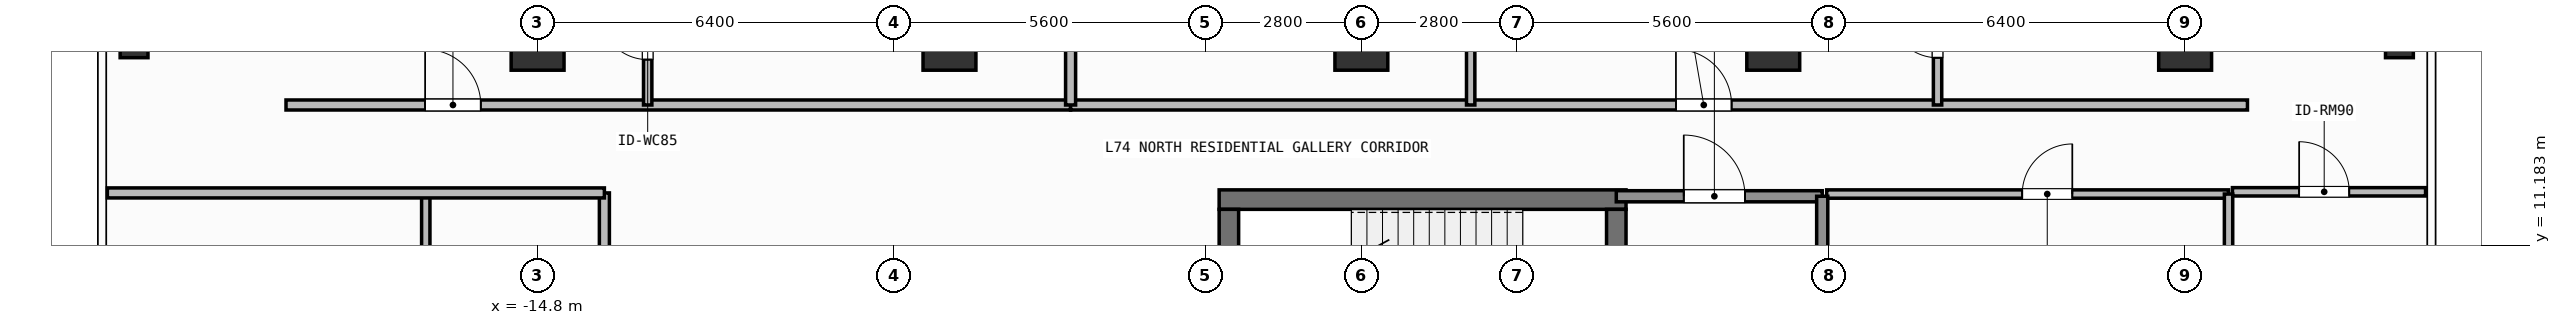
"""IFC4 building model, lengths in metres.
Left out: names, types, materials, properties, quantities, classifications, styles, units other than length and angle.
Written with IfcOpenShell. Run it as: python <this file> out.ifc"""

import sys

from ifc_helpers import new_model, si_unit, direction, frame, frame_2d, origin, origin_2d, place, context, subcontext, project, spatial, rectangle, hollow_rectangle, extrude, element, fill, save


model = new_model("IFC4")
c1 = context("Model", 3, precision=1e-05, world=origin(), true_north=direction((0.0, 1.0)))
c2 = subcontext(c1, "Body", "Model", "MODEL_VIEW")
j1 = project(units=[si_unit("LENGTHUNIT", "METRE"), si_unit("PLANEANGLEUNIT", "RADIAN")], contexts=[c1])
p1 = place(None, origin())
s1 = spatial("IfcSite", under=j1, at=p1, CompositionType="ELEMENT")
p2 = place(p1, origin())
s2 = spatial("IfcBuilding", under=s1, at=p2, CompositionType="ELEMENT")
p3 = place(p2, frame((0.0, 0.0, 301.5)))
s3 = spatial("IfcBuildingStorey", under=s2, at=p3, CompositionType="ELEMENT", Elevation=301.5)
p4 = place(p3, frame((-2.555, 12.0, 0.0), z_axis=(0.0, 0.0, 1.0), x_axis=(1.0, 0.0, 0.0)))
e1 = element("IfcWall", 1, at=p4, inside=s3, PredefinedType="SHEAR", context=c2, shape_type="SweptSolid", body=[
    extrude(rectangle(XDim=7.31, YDim=0.35, at=frame_2d((3.655, 0.0))), origin(), (0.0, 0.0, 1.0), 3.9),
])
p5 = place(p3, frame((-2.38, 8.9, 0.0), z_axis=(0.0, 0.0, 1.0), x_axis=(0.0, 1.0, 0.0)))
e2 = element("IfcWall", 2, at=p5, inside=s3, PredefinedType="SHEAR", context=c2, shape_type="SweptSolid", body=[
    extrude(rectangle(XDim=2.925, YDim=0.35, at=frame_2d((1.462, 0.0))), origin(), (0.0, 0.0, 1.0), 3.9),
])
p6 = place(p3, frame((4.58, 11.825, 0.0), z_axis=(0.0, 0.0, 1.0), x_axis=(0.0, -1.0, 0.0)))
e3 = element("IfcWall", 3, at=p6, inside=s3, PredefinedType="SHEAR", context=c2, shape_type="SweptSolid", body=[
    extrude(rectangle(XDim=2.925, YDim=0.35, at=frame_2d((1.462, 0.0))), origin(), (0.0, 0.0, 1.0), 3.9),
])
p7 = place(p6, frame((0.913, 0.0, 0.0)))
e4 = element("IfcOpeningElement", 4, at=p7, cuts=e3, PredefinedType="OPENING", context=c2, shape_type="SweptSolid", body=[
    extrude(rectangle(XDim=1.1, YDim=2.15, at=frame_2d((0.55, 1.075))), frame((0.0, 0.185, 0.0), z_axis=(0.0, -1.0, 0.0), x_axis=(1.0, 0.0, 0.0)), (0.0, 0.0, 1.0), 0.37),
])
for number, where, z_axis, x_axis in (
    (5, (-14.8, 14.8, 0.0), (0.0, 0.0, 1.0), (1.0, 0.0, 0.0)),
    (6, (-7.4, 14.8, 0.0), (0.0, 0.0, 1.0), (1.0, 0.0, 0.0)),
    (7, (0.0, 14.8, 0.0), (0.0, 0.0, 1.0), (1.0, 0.0, 0.0)),
    (8, (7.4, 14.8, 0.0), (0.0, 0.0, 1.0), (1.0, 0.0, 0.0)),
    (9, (14.8, 14.8, 0.0), (0.0, 0.0, 1.0), (1.0, 0.0, 0.0)),
):
    element("IfcColumn", number, at=place(p3, frame(where, z_axis=z_axis, x_axis=x_axis)), inside=s3, PredefinedType="COLUMN", context=c2, shape_type="SweptSolid", body=[
        extrude(rectangle(XDim=0.95, YDim=0.95, at=origin_2d()), origin(), (0.0, 0.0, 1.0), 3.9),
    ])
for number, where, z_axis, x_axis in (
    (10, (-22.05, 14.8, 0.0), (0.0, 0.0, 1.0), (1.0, 0.0, 0.0)),
    (11, (18.65, 14.8, 0.0), (0.0, 0.0, 1.0), (1.0, 0.0, 0.0)),
):
    element("IfcColumn", number, at=place(p3, frame(where, z_axis=z_axis, x_axis=x_axis)), inside=s3, PredefinedType="COLUMN", context=c2, shape_type="SweptSolid", body=[
        extrude(hollow_rectangle(XDim=0.5, YDim=0.5, WallThickness=0.025, at=origin_2d()), origin(), (0.0, 0.0, 1.0), 3.9),
    ])
p8 = place(p3, frame((4.58, 12.06, 0.0), z_axis=(0.0, 0.0, 1.0), x_axis=(1.0, 0.0, 0.0)))
e12 = element("IfcWall", 12, at=p8, inside=s3, PredefinedType="SOLIDWALL", context=c2, shape_type="SweptSolid", body=[
    extrude(rectangle(XDim=3.7, YDim=0.2, at=frame_2d((1.85, 0.0))), origin(), (0.0, 0.0, 1.0), 3.68),
])
p9 = place(p8, frame((1.212, 0.0, 0.0)))
e13 = element("IfcOpeningElement", 13, at=p9, cuts=e12, PredefinedType="OPENING", context=c2, shape_type="SweptSolid", body=[
    extrude(rectangle(XDim=1.1, YDim=2.15, at=frame_2d((0.55, 1.075))), frame((0.0, 0.11, 0.0), z_axis=(0.0, -1.0, 0.0), x_axis=(1.0, 0.0, 0.0)), (0.0, 0.0, 1.0), 0.22),
])
p10 = place(p3, frame((8.36, 12.1, 0.0), z_axis=(0.0, 0.0, 1.0), x_axis=(1.0, 0.0, 0.0)))
e14 = element("IfcWall", 14, at=p10, inside=s3, PredefinedType="PARTITIONING", context=c2, shape_type="SweptSolid", body=[
    extrude(rectangle(XDim=7.22, YDim=0.15, at=frame_2d((3.61, 0.0))), origin(), (0.0, 0.0, 1.0), 3.68),
])
p11 = place(p10, frame((3.513, 0.0, 0.0)))
e15 = element("IfcOpeningElement", 15, at=p11, cuts=e14, PredefinedType="OPENING", context=c2, shape_type="SweptSolid", body=[
    extrude(rectangle(XDim=0.9, YDim=2.1, at=frame_2d((0.45, 1.05))), frame((0.0, 0.085, 0.0), z_axis=(0.0, -1.0, 0.0), x_axis=(1.0, 0.0, 0.0)), (0.0, 0.0, 1.0), 0.17),
])
p12 = place(p3, frame((-19.32, 13.7, 0.0), z_axis=(0.0, 0.0, 1.0), x_axis=(1.0, 0.0, 0.0)))
e16 = element("IfcWall", 16, at=p12, inside=s3, PredefinedType="PARTITIONING", context=c2, shape_type="SweptSolid", body=[
    extrude(rectangle(XDim=14.096, YDim=0.18, at=frame_2d((7.048, 0.0))), origin(), (0.0, 0.0, 1.0), 3.68),
])
p13 = place(p12, frame((2.499, 0.0, 0.0)))
e17 = element("IfcOpeningElement", 17, at=p13, cuts=e16, PredefinedType="OPENING", context=c2, shape_type="SweptSolid", body=[
    extrude(rectangle(XDim=1.0, YDim=2.2, at=frame_2d((0.5, 1.1))), frame((0.0, 0.1, 0.0), z_axis=(0.0, -1.0, 0.0), x_axis=(1.0, 0.0, 0.0)), (0.0, 0.0, 1.0), 0.2),
])
p14 = place(p3, frame((-12.822, 13.7, 0.0), z_axis=(0.0, 0.0, 1.0), x_axis=(0.0, 1.0, 0.0)))
e18 = element("IfcWall", 18, at=p14, inside=s3, PredefinedType="PARTITIONING", context=c2, shape_type="SweptSolid", body=[
    extrude(rectangle(XDim=2.317, YDim=0.15, at=frame_2d((1.159, 0.0))), origin(), (0.0, 0.0, 1.0), 3.68),
])
p15 = place(p14, frame((0.815, 0.0, 0.0)))
e19 = element("IfcOpeningElement", 19, at=p15, cuts=e18, PredefinedType="OPENING", context=c2, shape_type="SweptSolid", body=[
    extrude(rectangle(XDim=0.85, YDim=2.1, at=frame_2d((0.425, 1.05))), frame((0.0, 0.085, 0.0), z_axis=(0.0, -1.0, 0.0), x_axis=(1.0, 0.0, 0.0)), (0.0, 0.0, 1.0), 0.17),
])
p16 = place(p3, frame((-5.224, 13.7, 0.0), z_axis=(0.0, 0.0, 1.0), x_axis=(1.0, 0.0, 0.0)))
e20 = element("IfcWall", 20, at=p16, inside=s3, PredefinedType="PARTITIONING", context=c2, shape_type="SweptSolid", body=[
    extrude(rectangle(XDim=21.144, YDim=0.18, at=frame_2d((10.572, 0.0))), origin(), (0.0, 0.0, 1.0), 3.68),
])
p17 = place(p16, frame((10.876, 0.0, 0.0)))
e21 = element("IfcOpeningElement", 21, at=p17, cuts=e20, PredefinedType="OPENING", context=c2, shape_type="SweptSolid", body=[
    extrude(rectangle(XDim=1.0, YDim=2.2, at=frame_2d((0.5, 1.1))), frame((0.0, 0.1, 0.0), z_axis=(0.0, -1.0, 0.0), x_axis=(1.0, 0.0, 0.0)), (0.0, 0.0, 1.0), 0.2),
])
p18 = place(p3, frame((1.964, 13.7, 0.0), z_axis=(0.0, 0.0, 1.0), x_axis=(0.0, 1.0, 0.0)))
e22 = element("IfcWall", 22, at=p18, inside=s3, PredefinedType="PARTITIONING", context=c2, shape_type="SweptSolid", body=[
    extrude(rectangle(XDim=4.29, YDim=0.15, at=frame_2d((2.145, 0.0))), origin(), (0.0, 0.0, 1.0), 3.68),
])
p19 = place(p18, frame((1.72, 0.0, 0.0)))
e23 = element("IfcOpeningElement", 23, at=p19, cuts=e22, PredefinedType="OPENING", context=c2, shape_type="SweptSolid", body=[
    extrude(rectangle(XDim=0.85, YDim=2.1, at=frame_2d((0.425, 1.05))), frame((0.0, 0.085, 0.0), z_axis=(0.0, -1.0, 0.0), x_axis=(1.0, 0.0, 0.0)), (0.0, 0.0, 1.0), 0.17),
])
p20 = place(p3, frame((10.352, 13.7, 0.0), z_axis=(0.0, 0.0, 1.0), x_axis=(0.0, 1.0, 0.0)))
e24 = element("IfcWall", 24, at=p20, inside=s3, PredefinedType="PARTITIONING", context=c2, shape_type="SweptSolid", body=[
    extrude(rectangle(XDim=2.72, YDim=0.15, at=frame_2d((1.36, 0.0))), origin(), (0.0, 0.0, 1.0), 3.68),
])
p21 = place(p20, frame((0.849, 0.0, 0.0)))
e25 = element("IfcOpeningElement", 25, at=p21, cuts=e24, PredefinedType="OPENING", context=c2, shape_type="SweptSolid", body=[
    extrude(rectangle(XDim=0.85, YDim=2.1, at=frame_2d((0.425, 1.05))), frame((0.0, 0.085, 0.0), z_axis=(0.0, -1.0, 0.0), x_axis=(1.0, 0.0, 0.0)), (0.0, 0.0, 1.0), 0.17),
])
p22 = place(p3, frame((-13.6, -12.12, 0.0), z_axis=(0.0, 0.0, 1.0), x_axis=(0.0, 1.0, 0.0)))
e26 = element("IfcWall", 26, at=p22, inside=s3, PredefinedType="PARTITIONING", context=c2, shape_type="SweptSolid", body=[
    extrude(rectangle(XDim=24.24, YDim=0.18, at=frame_2d((12.12, 0.0))), origin(), (0.0, 0.0, 1.0), 3.68),
])
p23 = place(p22, frame((9.829, 0.0, 0.0)))
e27 = element("IfcOpeningElement", 27, at=p23, cuts=e26, PredefinedType="OPENING", context=c2, shape_type="SweptSolid", body=[
    extrude(rectangle(XDim=1.0, YDim=2.2, at=frame_2d((0.5, 1.1))), frame((0.0, 0.1, 0.0), z_axis=(0.0, -1.0, 0.0), x_axis=(1.0, 0.0, 0.0)), (0.0, 0.0, 1.0), 0.2),
])
p24 = place(p3, frame((15.65, 12.14, 0.0), z_axis=(0.0, 0.0, 1.0), x_axis=(1.0, 0.0, 0.0)))
e28 = element("IfcWall", 28, at=p24, inside=s3, PredefinedType="PARTITIONING", context=c2, shape_type="SweptSolid", body=[
    extrude(rectangle(XDim=3.47, YDim=0.15, at=frame_2d((1.735, 0.0))), origin(), (0.0, 0.0, 1.0), 3.68),
])
p25 = place(p24, frame((1.198, 0.0, 0.0)))
e29 = element("IfcOpeningElement", 29, at=p25, cuts=e28, PredefinedType="OPENING", context=c2, shape_type="SweptSolid", body=[
    extrude(rectangle(XDim=0.9, YDim=2.1, at=frame_2d((0.45, 1.05))), frame((0.0, 0.085, 0.0), z_axis=(0.0, -1.0, 0.0), x_axis=(1.0, 0.0, 0.0)), (0.0, 0.0, 1.0), 0.17),
])
p26 = place(p3, frame((8.28, 8.725, 0.0), z_axis=(0.0, 0.0, 1.0), x_axis=(0.0, 1.0, 0.0)))
e30 = element("IfcWall", 30, at=p26, inside=s3, PredefinedType="SOLIDWALL", context=c2, shape_type="SweptSolid", body=[
    extrude(rectangle(XDim=3.335, YDim=0.2, at=frame_2d((1.667, 0.0))), origin(), (0.0, 0.0, 1.0), 3.68),
])
p27 = place(p3, frame((15.58, 5.85, 0.0), z_axis=(0.0, 0.0, 1.0), x_axis=(0.0, 1.0, 0.0)))
e31 = element("IfcWall", 31, at=p27, inside=s3, PredefinedType="PARTITIONING", context=c2, shape_type="SweptSolid", body=[
    extrude(rectangle(XDim=6.25, YDim=0.15, at=frame_2d((3.125, 0.0))), origin(), (0.0, 0.0, 1.0), 3.68),
])
p28 = place(p3, frame((-5.224, 13.7, 0.0), z_axis=(0.0, 0.0, 1.0), x_axis=(0.0, 1.0, 0.0)))
e32 = element("IfcWall", 32, at=p28, inside=s3, PredefinedType="PARTITIONING", context=c2, shape_type="SweptSolid", body=[
    extrude(rectangle(XDim=7.33, YDim=0.18, at=frame_2d((3.665, 0.0))), origin(), (0.0, 0.0, 1.0), 3.68),
])
p29 = place(p3, frame((-16.809, 5.436, 0.0), z_axis=(0.0, 0.0, 1.0), x_axis=(0.0, 1.0, 0.0)))
e33 = element("IfcWall", 33, at=p29, inside=s3, PredefinedType="PARTITIONING", context=c2, shape_type="SweptSolid", body=[
    extrude(rectangle(XDim=6.684, YDim=0.15, at=frame_2d((3.342, 0.0))), origin(), (0.0, 0.0, 1.0), 3.68),
])
p30 = place(p3, frame((-22.53, 12.12, 0.0), z_axis=(0.0, 0.0, 1.0), x_axis=(1.0, 0.0, 0.0)))
e34 = element("IfcWall", 34, at=p30, inside=s3, PredefinedType="PARTITIONING", context=c2, shape_type="SweptSolid", body=[
    extrude(rectangle(XDim=8.93, YDim=0.18, at=frame_2d((4.465, 0.0))), origin(), (0.0, 0.0, 1.0), 3.68),
])
p31 = place(p9, origin())
e35 = element("IfcDoor", 35, at=p31, inside=s3, OperationType="SINGLE_SWING_LEFT", PredefinedType="DOOR", context=c2, shape_type="SweptSolid", body=[
    extrude(rectangle(XDim=1.1, YDim=2.15, at=frame_2d((0.55, 1.075))), frame((0.0, 0.025, 0.0), z_axis=(0.0, -1.0, 0.0), x_axis=(1.0, 0.0, 0.0)), (0.0, 0.0, 1.0), 0.05),
])
fill(e13, e35)
p32 = place(p11, origin())
e36 = element("IfcDoor", 36, at=p32, inside=s3, OperationType="SINGLE_SWING_RIGHT", PredefinedType="DOOR", context=c2, shape_type="SweptSolid", body=[
    extrude(rectangle(XDim=0.9, YDim=2.1, at=frame_2d((0.45, 1.05))), frame((0.0, 0.025, 0.0), z_axis=(0.0, -1.0, 0.0), x_axis=(1.0, 0.0, 0.0)), (0.0, 0.0, 1.0), 0.05),
])
fill(e15, e36)
p33 = place(p13, origin())
e37 = element("IfcDoor", 37, at=p33, inside=s3, OperationType="SINGLE_SWING_LEFT", PredefinedType="DOOR", context=c2, shape_type="SweptSolid", body=[
    extrude(rectangle(XDim=1.0, YDim=2.2, at=frame_2d((0.5, 1.1))), frame((0.0, 0.025, 0.0), z_axis=(0.0, -1.0, 0.0), x_axis=(1.0, 0.0, 0.0)), (0.0, 0.0, 1.0), 0.05),
])
fill(e17, e37)
p34 = place(p15, origin())
e38 = element("IfcDoor", 38, at=p34, inside=s3, OperationType="SINGLE_SWING_RIGHT", PredefinedType="DOOR", context=c2, shape_type="SweptSolid", body=[
    extrude(rectangle(XDim=0.85, YDim=2.1, at=frame_2d((0.425, 1.05))), frame((0.0, 0.025, 0.0), z_axis=(0.0, -1.0, 0.0), x_axis=(1.0, 0.0, 0.0)), (0.0, 0.0, 1.0), 0.05),
])
fill(e19, e38)
p35 = place(p17, origin())
e39 = element("IfcDoor", 39, at=p35, inside=s3, OperationType="SINGLE_SWING_LEFT", PredefinedType="DOOR", context=c2, shape_type="SweptSolid", body=[
    extrude(rectangle(XDim=1.0, YDim=2.2, at=frame_2d((0.5, 1.1))), frame((0.0, 0.025, 0.0), z_axis=(0.0, -1.0, 0.0), x_axis=(1.0, 0.0, 0.0)), (0.0, 0.0, 1.0), 0.05),
])
fill(e21, e39)
p36 = place(p21, origin())
e40 = element("IfcDoor", 40, at=p36, inside=s3, OperationType="SINGLE_SWING_RIGHT", PredefinedType="DOOR", context=c2, shape_type="SweptSolid", body=[
    extrude(rectangle(XDim=0.85, YDim=2.1, at=frame_2d((0.425, 1.05))), frame((0.0, 0.025, 0.0), z_axis=(0.0, -1.0, 0.0), x_axis=(1.0, 0.0, 0.0)), (0.0, 0.0, 1.0), 0.05),
])
fill(e25, e40)
p37 = place(p25, origin())
e41 = element("IfcDoor", 41, at=p37, inside=s3, OperationType="SINGLE_SWING_LEFT", PredefinedType="DOOR", context=c2, shape_type="SweptSolid", body=[
    extrude(rectangle(XDim=0.9, YDim=2.1, at=frame_2d((0.45, 1.05))), frame((0.0, 0.025, 0.0), z_axis=(0.0, -1.0, 0.0), x_axis=(1.0, 0.0, 0.0)), (0.0, 0.0, 1.0), 0.05),
])
fill(e29, e41)
save(model, sys.argv[1])
